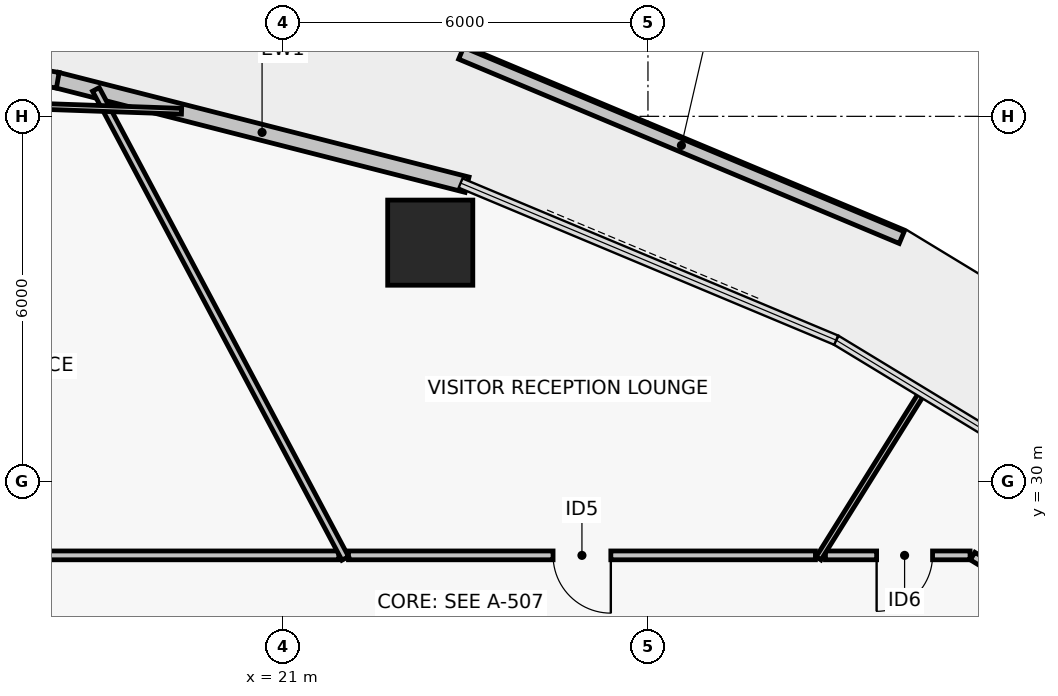
"""IFC4 building model, lengths in metres.
Left out: names, types, materials, properties, quantities, classifications, styles, units other than length and angle.
Written with IfcOpenShell. Run it as: python <this file> out.ifc"""

import sys

from ifc_helpers import new_model, si_unit, direction, frame, frame_2d, origin, origin_2d, place, context, subcontext, project, spatial, rectangle, hollow_rectangle, extrude, element, fill, save


model = new_model("IFC4")
c1 = context("Model", 3, precision=1e-05, world=origin(), true_north=direction((0.0, 1.0)))
c2 = subcontext(c1, "Body", "Model", "MODEL_VIEW")
j1 = project(units=[si_unit("LENGTHUNIT", "METRE"), si_unit("PLANEANGLEUNIT", "RADIAN")], contexts=[c1])
p1 = place(None, origin())
s1 = spatial("IfcSite", under=j1, at=p1, CompositionType="ELEMENT")
p2 = place(p1, origin())
s2 = spatial("IfcBuilding", under=s1, at=p2, CompositionType="ELEMENT")
p3 = place(p2, frame((0.0, 0.0, 27.6)))
s3 = spatial("IfcBuildingStorey", under=s2, at=p3, CompositionType="ELEMENT", Elevation=27.6)
p4 = place(p3, frame((23.419, 33.923, 0.0), z_axis=(0.0, 0.0, 1.0), x_axis=(1.0, 0.0, 0.0)))
e1 = element("IfcColumn", 1, at=p4, inside=s3, PredefinedType="COLUMN", context=c2, shape_type="SweptSolid", body=[
    extrude(hollow_rectangle(XDim=1.4, YDim=1.4, WallThickness=0.055, at=origin_2d()), origin(), (0.0, 0.0, 1.0), 3.72),
])
p5 = place(p3, frame((17.282, 36.596, 0.0), z_axis=(0.0, 0.0, 1.0), x_axis=(0.968977974408, -0.247147092057, 0.0)))
e2 = element("IfcWall", 2, at=p5, inside=s3, PredefinedType="PARTITIONING", context=c2, shape_type="SweptSolid", body=[
    extrude(rectangle(XDim=6.959, YDim=0.26, at=frame_2d((3.479, 0.0))), origin(), (0.0, 0.0, 1.0), 3.47),
])
p6 = place(p3, frame((14.915, 36.997, 0.0), z_axis=(0.0, 0.0, 1.0), x_axis=(0.985905469923, -0.167303330437, 0.0)))
e3 = element("IfcWall", 3, at=p6, inside=s3, PredefinedType="PARTITIONING", context=c2, shape_type="SweptSolid", body=[
    extrude(rectangle(XDim=2.412, YDim=0.26, at=frame_2d((1.206, 0.0))), origin(), (0.0, 0.0, 1.0), 3.47),
])
p7 = place(p3, frame((23.927, 37.037, 0.0), z_axis=(0.0, 0.0, 1.0), x_axis=(0.922553724433, -0.385868663582, 0.0)))
e4 = element("IfcWall", 4, at=p7, inside=s3, PredefinedType="PARAPET", context=c2, shape_type="SweptSolid", body=[
    extrude(rectangle(XDim=7.854, YDim=0.21, at=frame_2d((3.927, 0.0))), origin(), (0.0, 0.0, 1.0), 1.15),
])
p8 = place(p3, frame((32.842, 28.463, 0.0), z_axis=(0.0, 0.0, 1.0), x_axis=(-0.854807247113, 0.518945633264, 0.0)))
e5 = element("IfcWall", 5, at=p8, inside=s3, PredefinedType="PARTITIONING", context=c2, shape_type="SweptSolid", body=[
    extrude(rectangle(XDim=0.588, YDim=0.145, at=frame_2d((0.294, 0.0))), origin(), (0.0, 0.0, 1.0), 3.0),
])
p9 = place(p3, frame((32.297, 28.78, 0.0), z_axis=(0.0, 0.0, 1.0), x_axis=(-1.0, 0.0, 0.0)))
e6 = element("IfcWall", 6, at=p9, inside=s3, PredefinedType="PARTITIONING", context=c2, shape_type="SweptSolid", body=[
    extrude(rectangle(XDim=2.378, YDim=0.145, at=frame_2d((1.189, 0.0))), origin(), (0.0, 0.0, 1.0), 3.0),
])
p10 = place(p9, frame((0.617, 0.0, 0.0)))
e7 = element("IfcOpeningElement", 7, at=p10, cuts=e6, PredefinedType="OPENING", context=c2, shape_type="SweptSolid", body=[
    extrude(rectangle(XDim=0.92, YDim=2.05, at=frame_2d((0.46, 1.025))), frame((0.0, 0.083, 0.0), z_axis=(0.0, -1.0, 0.0), x_axis=(1.0, 0.0, 0.0)), (0.0, 0.0, 1.0), 0.165),
])
p11 = place(p3, frame((29.754, 28.78, 0.0), z_axis=(0.0, 0.0, 1.0), x_axis=(-1.0, 0.0, 0.0)))
e8 = element("IfcWall", 8, at=p11, inside=s3, PredefinedType="PARTITIONING", context=c2, shape_type="SweptSolid", body=[
    extrude(rectangle(XDim=7.68, YDim=0.145, at=frame_2d((3.84, 0.0))), origin(), (0.0, 0.0, 1.0), 2.6),
])
p12 = place(p11, frame((3.365, 0.0, 0.0)))
e9 = element("IfcOpeningElement", 9, at=p12, cuts=e8, PredefinedType="OPENING", context=c2, shape_type="SweptSolid", body=[
    extrude(rectangle(XDim=0.95, YDim=2.06, at=frame_2d((0.475, 1.03))), frame((0.0, 0.083, 0.0), z_axis=(0.0, -1.0, 0.0), x_axis=(1.0, 0.0, 0.0)), (0.0, 0.0, 1.0), 0.165),
])
p13 = place(p3, frame((21.916, 28.78, 0.0), z_axis=(0.0, 0.0, 1.0), x_axis=(-1.0, 0.0, 0.0)))
e10 = element("IfcWall", 10, at=p13, inside=s3, PredefinedType="PARTITIONING", context=c2, shape_type="SweptSolid", body=[
    extrude(rectangle(XDim=6.016, YDim=0.145, at=frame_2d((3.008, 0.0))), origin(), (0.0, 0.0, 1.0), 2.6),
])
p14 = place(p3, frame((29.805, 28.73, 0.0), z_axis=(0.0, 0.0, 1.0), x_axis=(0.529903768235, 0.848057778934, 0.0)))
e11 = element("IfcWall", 11, at=p14, inside=s3, PredefinedType="PARTITIONING", context=c2, shape_type="SweptSolid", body=[
    extrude(rectangle(XDim=3.228, YDim=0.095, at=frame_2d((1.614, 0.0))), origin(), (0.0, 0.0, 1.0), 2.85),
])
p15 = place(p3, frame((22.021, 28.73, 0.0), z_axis=(0.0, 0.0, 1.0), x_axis=(-0.469465111929, 0.88295102281, 0.0)))
e12 = element("IfcWall", 12, at=p15, inside=s3, PredefinedType="PARTITIONING", context=c2, shape_type="SweptSolid", body=[
    extrude(rectangle(XDim=8.736, YDim=0.125, at=frame_2d((4.368, 0.0))), origin(), (0.0, 0.0, 1.0), 2.85),
])
p16 = place(p3, frame((19.329, 36.084, 0.0), z_axis=(0.0, 0.0, 1.0), x_axis=(-0.999389725088, 0.03493103762, 0.0)))
e13 = element("IfcWall", 13, at=p16, inside=s3, PredefinedType="PARTITIONING", context=c2, shape_type="SweptSolid", body=[
    extrude(rectangle(XDim=3.641, YDim=0.095, at=frame_2d((1.821, 0.0))), origin(), (0.0, 0.0, 1.0), 3.47),
])
p17 = place(p10, origin())
e14 = element("IfcDoor", 14, at=p17, inside=s3, OperationType="SINGLE_SWING_RIGHT", PredefinedType="DOOR", context=c2, shape_type="SweptSolid", body=[
    extrude(rectangle(XDim=0.92, YDim=2.05, at=frame_2d((0.46, 1.025))), frame((0.0, 0.025, 0.0), z_axis=(0.0, -1.0, 0.0), x_axis=(1.0, 0.0, 0.0)), (0.0, 0.0, 1.0), 0.05),
])
fill(e7, e14)
p18 = place(p12, origin())
e15 = element("IfcDoor", 15, at=p18, inside=s3, OperationType="SINGLE_SWING_LEFT", PredefinedType="DOOR", context=c2, shape_type="SweptSolid", body=[
    extrude(rectangle(XDim=0.95, YDim=2.06, at=frame_2d((0.475, 1.03))), frame((0.0, 0.025, 0.0), z_axis=(0.0, -1.0, 0.0), x_axis=(1.0, 0.0, 0.0)), (0.0, 0.0, 1.0), 0.05),
])
fill(e9, e15)
save(model, sys.argv[1])
